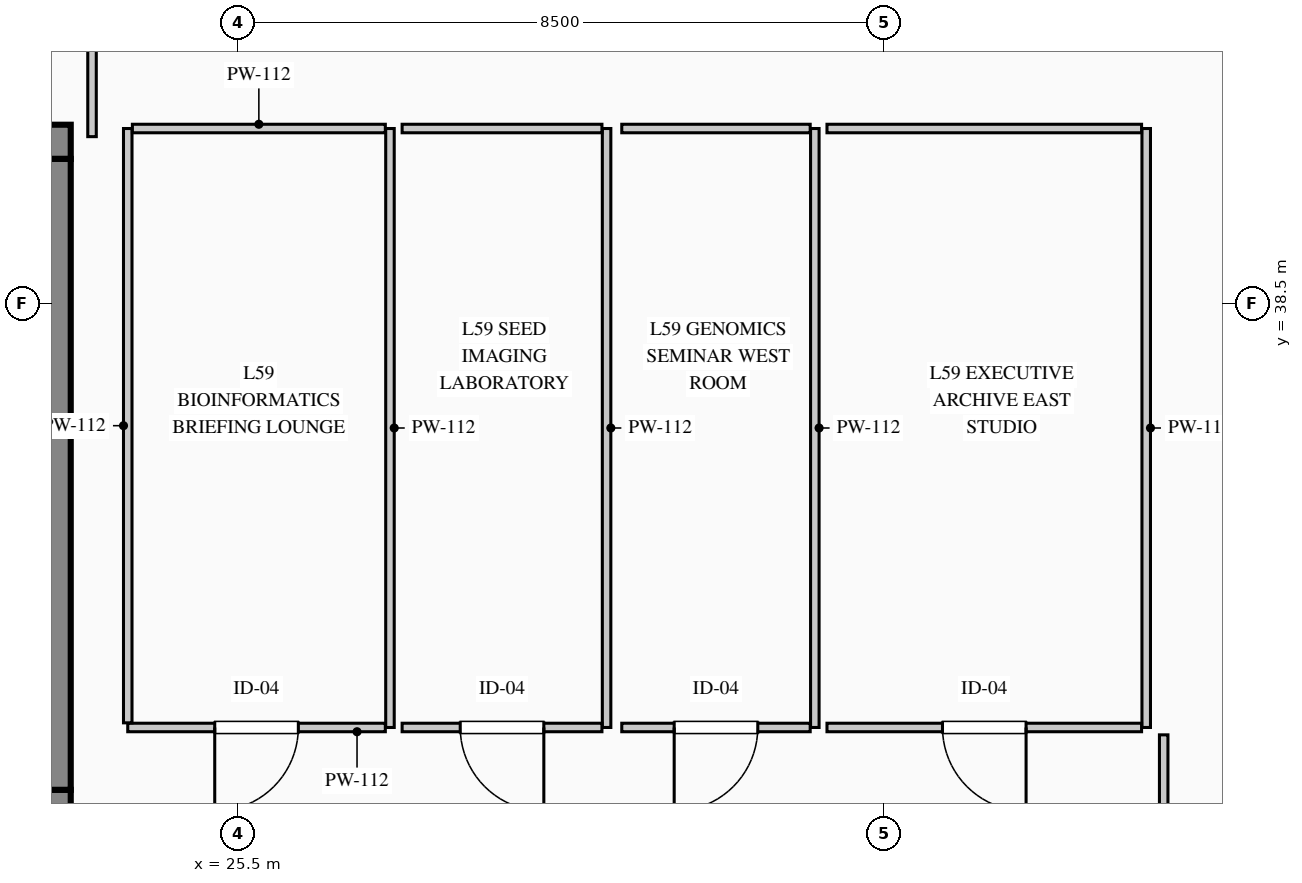
"""IFC4 building model, lengths in metres.
Left out: names, types, materials, properties, quantities, classifications, styles, units other than length and angle.
Written with IfcOpenShell. Run it as: python <this file> out.ifc"""

import sys

from ifc_helpers import new_model, si_unit, direction, frame, frame_2d, origin, place, context, subcontext, project, spatial, rectangle, extrude, element, fill, save


model = new_model("IFC4")
c1 = context("Model", 3, precision=1e-05, world=origin(), true_north=direction((0.0, 1.0)))
c2 = subcontext(c1, "Body", "Model", "MODEL_VIEW")
j1 = project(units=[si_unit("LENGTHUNIT", "METRE"), si_unit("PLANEANGLEUNIT", "RADIAN")], contexts=[c1])
p1 = place(None, origin())
s1 = spatial("IfcSite", under=j1, at=p1, CompositionType="ELEMENT")
p2 = place(p1, origin())
s2 = spatial("IfcBuilding", under=s1, at=p2, CompositionType="ELEMENT")
p3 = place(p2, frame((0.0, 0.0, 246.95)))
s3 = spatial("IfcBuildingStorey", under=s2, at=p3, CompositionType="ELEMENT", Elevation=246.95)
p4 = place(p3, frame((5.55, 40.625, 0.0), z_axis=(0.0, 0.0, 1.0), x_axis=(1.0, 0.0, 0.0)))
e1 = element("IfcWall", 1, at=p4, inside=s3, PredefinedType="SHEAR", context=c2, shape_type="SweptSolid", body=[
    extrude(rectangle(XDim=17.75, YDim=0.45, at=frame_2d((8.875, 0.0))), origin(), (0.0, 0.0, 1.0), 3.95),
])
p5 = place(p4, frame((15.895, 0.0, 0.0)))
e2 = element("IfcOpeningElement", 2, at=p5, cuts=e1, PredefinedType="OPENING", context=c2, shape_type="SweptSolid", body=[
    extrude(rectangle(XDim=1.18, YDim=2.25, at=frame_2d((0.59, 1.125))), frame((0.0, 0.235, 0.0), z_axis=(0.0, -1.0, 0.0), x_axis=(1.0, 0.0, 0.0)), (0.0, 0.0, 1.0), 0.47),
])
p6 = place(p3, frame((5.55, 31.875, 0.0), z_axis=(0.0, 0.0, 1.0), x_axis=(1.0, 0.0, 0.0)))
e3 = element("IfcWall", 3, at=p6, inside=s3, PredefinedType="SHEAR", context=c2, shape_type="SweptSolid", body=[
    extrude(rectangle(XDim=17.75, YDim=0.45, at=frame_2d((8.875, 0.0))), origin(), (0.0, 0.0, 1.0), 3.95),
])
p7 = place(p6, frame((3.1, 0.0, 0.0)))
e4 = element("IfcOpeningElement", 4, at=p7, cuts=e3, PredefinedType="OPENING", context=c2, shape_type="SweptSolid", body=[
    extrude(rectangle(XDim=1.2, YDim=2.2, at=frame_2d((0.6, 1.1))), frame((0.0, 0.235, 0.0), z_axis=(0.0, -1.0, 0.0), x_axis=(1.0, 0.0, 0.0)), (0.0, 0.0, 1.0), 0.47),
])
p8 = place(p6, frame((6.95, 0.0, 0.0)))
e5 = element("IfcOpeningElement", 5, at=p8, cuts=e3, PredefinedType="OPENING", context=c2, shape_type="SweptSolid", body=[
    extrude(rectangle(XDim=1.2, YDim=2.2, at=frame_2d((0.6, 1.1))), frame((0.0, 0.235, 0.0), z_axis=(0.0, -1.0, 0.0), x_axis=(1.0, 0.0, 0.0)), (0.0, 0.0, 1.0), 0.47),
])
p9 = place(p6, frame((8.8, 0.0, 0.0)))
e6 = element("IfcOpeningElement", 6, at=p9, cuts=e3, PredefinedType="OPENING", context=c2, shape_type="SweptSolid", body=[
    extrude(rectangle(XDim=1.15, YDim=2.2, at=frame_2d((0.575, 1.1))), frame((0.0, 0.235, 0.0), z_axis=(0.0, -1.0, 0.0), x_axis=(1.0, 0.0, 0.0)), (0.0, 0.0, 1.0), 0.47),
])
p10 = place(p6, frame((15.9, 0.0, 0.0)))
e7 = element("IfcOpeningElement", 7, at=p10, cuts=e3, PredefinedType="OPENING", context=c2, shape_type="SweptSolid", body=[
    extrude(rectangle(XDim=1.2, YDim=2.2, at=frame_2d((0.6, 1.1))), frame((0.0, 0.235, 0.0), z_axis=(0.0, -1.0, 0.0), x_axis=(1.0, 0.0, 0.0)), (0.0, 0.0, 1.0), 0.47),
])
p11 = place(p3, frame((23.075, 32.1, 0.0), z_axis=(0.0, 0.0, 1.0), x_axis=(0.0, 1.0, 0.0)))
e8 = element("IfcWall", 8, at=p11, inside=s3, PredefinedType="SHEAR", context=c2, shape_type="SweptSolid", body=[
    extrude(rectangle(XDim=8.3, YDim=0.45, at=frame_2d((4.15, 0.0))), origin(), (0.0, 0.0, 1.0), 3.95),
])
p12 = place(p3, frame((27.5, 40.8, 0.0), z_axis=(0.0, 0.0, 1.0), x_axis=(0.0, -1.0, 0.0)))
e9 = element("IfcWall", 9, at=p12, inside=s3, PredefinedType="PARTITIONING", context=c2, shape_type="SweptSolid", body=[
    extrude(rectangle(XDim=7.88, YDim=0.112, at=frame_2d((3.94, 0.0))), origin(), (0.0, 0.0, 1.0), 3.6),
])
p13 = place(p3, frame((27.439, 32.92, 0.0), z_axis=(0.0, 0.0, 1.0), x_axis=(-1.0, 0.0, 0.0)))
e10 = element("IfcWall", 10, at=p13, inside=s3, PredefinedType="PARTITIONING", context=c2, shape_type="SweptSolid", body=[
    extrude(rectangle(XDim=3.389, YDim=0.112, at=frame_2d((1.694, 0.0))), origin(), (0.0, 0.0, 1.0), 3.6),
])
p14 = place(p13, frame((1.145, 0.0, 0.0)))
e11 = element("IfcOpeningElement", 11, at=p14, cuts=e10, PredefinedType="OPENING", context=c2, shape_type="SweptSolid", body=[
    extrude(rectangle(XDim=1.1, YDim=2.2, at=frame_2d((0.55, 1.1))), frame((0.0, 0.066, 0.0), z_axis=(0.0, -1.0, 0.0), x_axis=(1.0, 0.0, 0.0)), (0.0, 0.0, 1.0), 0.132),
])
p15 = place(p3, frame((24.05, 32.981, 0.0), z_axis=(0.0, 0.0, 1.0), x_axis=(0.0, 1.0, 0.0)))
e12 = element("IfcWall", 12, at=p15, inside=s3, PredefinedType="PARTITIONING", context=c2, shape_type="SweptSolid", body=[
    extrude(rectangle(XDim=7.819, YDim=0.112, at=frame_2d((3.91, 0.0))), origin(), (0.0, 0.0, 1.0), 3.6),
])
p16 = place(p3, frame((24.111, 40.8, 0.0), z_axis=(0.0, 0.0, 1.0), x_axis=(1.0, 0.0, 0.0)))
e13 = element("IfcWall", 13, at=p16, inside=s3, PredefinedType="PARTITIONING", context=c2, shape_type="SweptSolid", body=[
    extrude(rectangle(XDim=3.328, YDim=0.112, at=frame_2d((1.664, 0.0))), origin(), (0.0, 0.0, 1.0), 3.6),
])
p17 = place(p3, frame((30.35, 40.8, 0.0), z_axis=(0.0, 0.0, 1.0), x_axis=(0.0, -1.0, 0.0)))
e14 = element("IfcWall", 14, at=p17, inside=s3, PredefinedType="PARTITIONING", context=c2, shape_type="SweptSolid", body=[
    extrude(rectangle(XDim=7.88, YDim=0.112, at=frame_2d((3.94, 0.0))), origin(), (0.0, 0.0, 1.0), 3.6),
])
p18 = place(p3, frame((30.289, 32.92, 0.0), z_axis=(0.0, 0.0, 1.0), x_axis=(-1.0, 0.0, 0.0)))
e15 = element("IfcWall", 15, at=p18, inside=s3, PredefinedType="PARTITIONING", context=c2, shape_type="SweptSolid", body=[
    extrude(rectangle(XDim=2.629, YDim=0.112, at=frame_2d((1.314, 0.0))), origin(), (0.0, 0.0, 1.0), 3.6),
])
p19 = place(p18, frame((0.764, 0.0, 0.0)))
e16 = element("IfcOpeningElement", 16, at=p19, cuts=e15, PredefinedType="OPENING", context=c2, shape_type="SweptSolid", body=[
    extrude(rectangle(XDim=1.1, YDim=2.2, at=frame_2d((0.55, 1.1))), frame((0.0, 0.066, 0.0), z_axis=(0.0, -1.0, 0.0), x_axis=(1.0, 0.0, 0.0)), (0.0, 0.0, 1.0), 0.132),
])
p20 = place(p3, frame((27.66, 40.8, 0.0), z_axis=(0.0, 0.0, 1.0), x_axis=(1.0, 0.0, 0.0)))
e17 = element("IfcWall", 17, at=p20, inside=s3, PredefinedType="PARTITIONING", context=c2, shape_type="SweptSolid", body=[
    extrude(rectangle(XDim=2.629, YDim=0.112, at=frame_2d((1.314, 0.0))), origin(), (0.0, 0.0, 1.0), 3.6),
])
p21 = place(p3, frame((33.09, 40.8, 0.0), z_axis=(0.0, 0.0, 1.0), x_axis=(0.0, -1.0, 0.0)))
e18 = element("IfcWall", 18, at=p21, inside=s3, PredefinedType="PARTITIONING", context=c2, shape_type="SweptSolid", body=[
    extrude(rectangle(XDim=7.88, YDim=0.112, at=frame_2d((3.94, 0.0))), origin(), (0.0, 0.0, 1.0), 3.6),
])
p22 = place(p3, frame((33.029, 32.92, 0.0), z_axis=(0.0, 0.0, 1.0), x_axis=(-1.0, 0.0, 0.0)))
e19 = element("IfcWall", 19, at=p22, inside=s3, PredefinedType="PARTITIONING", context=c2, shape_type="SweptSolid", body=[
    extrude(rectangle(XDim=2.479, YDim=0.112, at=frame_2d((1.24, 0.0))), origin(), (0.0, 0.0, 1.0), 3.6),
])
p23 = place(p22, frame((0.689, 0.0, 0.0)))
e20 = element("IfcOpeningElement", 20, at=p23, cuts=e19, PredefinedType="OPENING", context=c2, shape_type="SweptSolid", body=[
    extrude(rectangle(XDim=1.1, YDim=2.2, at=frame_2d((0.55, 1.1))), frame((0.0, 0.066, 0.0), z_axis=(0.0, -1.0, 0.0), x_axis=(1.0, 0.0, 0.0)), (0.0, 0.0, 1.0), 0.132),
])
p24 = place(p3, frame((30.55, 40.8, 0.0), z_axis=(0.0, 0.0, 1.0), x_axis=(1.0, 0.0, 0.0)))
e21 = element("IfcWall", 21, at=p24, inside=s3, PredefinedType="PARTITIONING", context=c2, shape_type="SweptSolid", body=[
    extrude(rectangle(XDim=2.479, YDim=0.112, at=frame_2d((1.24, 0.0))), origin(), (0.0, 0.0, 1.0), 3.6),
])
p25 = place(p3, frame((37.45, 40.8, 0.0), z_axis=(0.0, 0.0, 1.0), x_axis=(0.0, -1.0, 0.0)))
e22 = element("IfcWall", 22, at=p25, inside=s3, PredefinedType="PARTITIONING", context=c2, shape_type="SweptSolid", body=[
    extrude(rectangle(XDim=7.88, YDim=0.112, at=frame_2d((3.94, 0.0))), origin(), (0.0, 0.0, 1.0), 3.6),
])
p26 = place(p3, frame((37.389, 32.92, 0.0), z_axis=(0.0, 0.0, 1.0), x_axis=(-1.0, 0.0, 0.0)))
e23 = element("IfcWall", 23, at=p26, inside=s3, PredefinedType="PARTITIONING", context=c2, shape_type="SweptSolid", body=[
    extrude(rectangle(XDim=4.139, YDim=0.112, at=frame_2d((2.069, 0.0))), origin(), (0.0, 0.0, 1.0), 3.6),
])
p27 = place(p26, frame((1.52, 0.0, 0.0)))
e24 = element("IfcOpeningElement", 24, at=p27, cuts=e23, PredefinedType="OPENING", context=c2, shape_type="SweptSolid", body=[
    extrude(rectangle(XDim=1.1, YDim=2.2, at=frame_2d((0.55, 1.1))), frame((0.0, 0.066, 0.0), z_axis=(0.0, -1.0, 0.0), x_axis=(1.0, 0.0, 0.0)), (0.0, 0.0, 1.0), 0.132),
])
p28 = place(p3, frame((33.25, 40.8, 0.0), z_axis=(0.0, 0.0, 1.0), x_axis=(1.0, 0.0, 0.0)))
e25 = element("IfcWall", 25, at=p28, inside=s3, PredefinedType="PARTITIONING", context=c2, shape_type="SweptSolid", body=[
    extrude(rectangle(XDim=4.139, YDim=0.112, at=frame_2d((2.069, 0.0))), origin(), (0.0, 0.0, 1.0), 3.6),
])
p29 = place(p3, frame((23.58, 40.693, 0.0), z_axis=(0.0, 0.0, 1.0), x_axis=(0.0, 1.0, 0.0)))
e26 = element("IfcWall", 26, at=p29, inside=s3, PredefinedType="PARTITIONING", context=c2, shape_type="SweptSolid", body=[
    extrude(rectangle(XDim=2.582, YDim=0.112, at=frame_2d((1.291, 0.0))), origin(), (0.0, 0.0, 1.0), 3.6),
])
p30 = place(p3, frame((37.68, 29.081, 0.0), z_axis=(0.0, 0.0, 1.0), x_axis=(0.0, 1.0, 0.0)))
e27 = element("IfcWall", 27, at=p30, inside=s3, PredefinedType="PARTITIONING", context=c2, shape_type="SweptSolid", body=[
    extrude(rectangle(XDim=3.742, YDim=0.112, at=frame_2d((1.871, 0.0))), origin(), (0.0, 0.0, 1.0), 3.6),
])
p31 = place(p14, origin())
e28 = element("IfcDoor", 28, at=p31, inside=s3, OperationType="SINGLE_SWING_RIGHT", PredefinedType="DOOR", context=c2, shape_type="SweptSolid", body=[
    extrude(rectangle(XDim=1.1, YDim=2.2, at=frame_2d((0.55, 1.1))), frame((0.0, 0.025, 0.0), z_axis=(0.0, -1.0, 0.0), x_axis=(1.0, 0.0, 0.0)), (0.0, 0.0, 1.0), 0.05),
])
fill(e11, e28)
p32 = place(p19, origin())
e29 = element("IfcDoor", 29, at=p32, inside=s3, OperationType="SINGLE_SWING_LEFT", PredefinedType="DOOR", context=c2, shape_type="SweptSolid", body=[
    extrude(rectangle(XDim=1.1, YDim=2.2, at=frame_2d((0.55, 1.1))), frame((0.0, 0.025, 0.0), z_axis=(0.0, -1.0, 0.0), x_axis=(1.0, 0.0, 0.0)), (0.0, 0.0, 1.0), 0.05),
])
fill(e16, e29)
p33 = place(p23, origin())
e30 = element("IfcDoor", 30, at=p33, inside=s3, OperationType="SINGLE_SWING_RIGHT", PredefinedType="DOOR", context=c2, shape_type="SweptSolid", body=[
    extrude(rectangle(XDim=1.1, YDim=2.2, at=frame_2d((0.55, 1.1))), frame((0.0, 0.025, 0.0), z_axis=(0.0, -1.0, 0.0), x_axis=(1.0, 0.0, 0.0)), (0.0, 0.0, 1.0), 0.05),
])
fill(e20, e30)
p34 = place(p27, origin())
e31 = element("IfcDoor", 31, at=p34, inside=s3, OperationType="SINGLE_SWING_LEFT", PredefinedType="DOOR", context=c2, shape_type="SweptSolid", body=[
    extrude(rectangle(XDim=1.1, YDim=2.2, at=frame_2d((0.55, 1.1))), frame((0.0, 0.025, 0.0), z_axis=(0.0, -1.0, 0.0), x_axis=(1.0, 0.0, 0.0)), (0.0, 0.0, 1.0), 0.05),
])
fill(e24, e31)
save(model, sys.argv[1])
